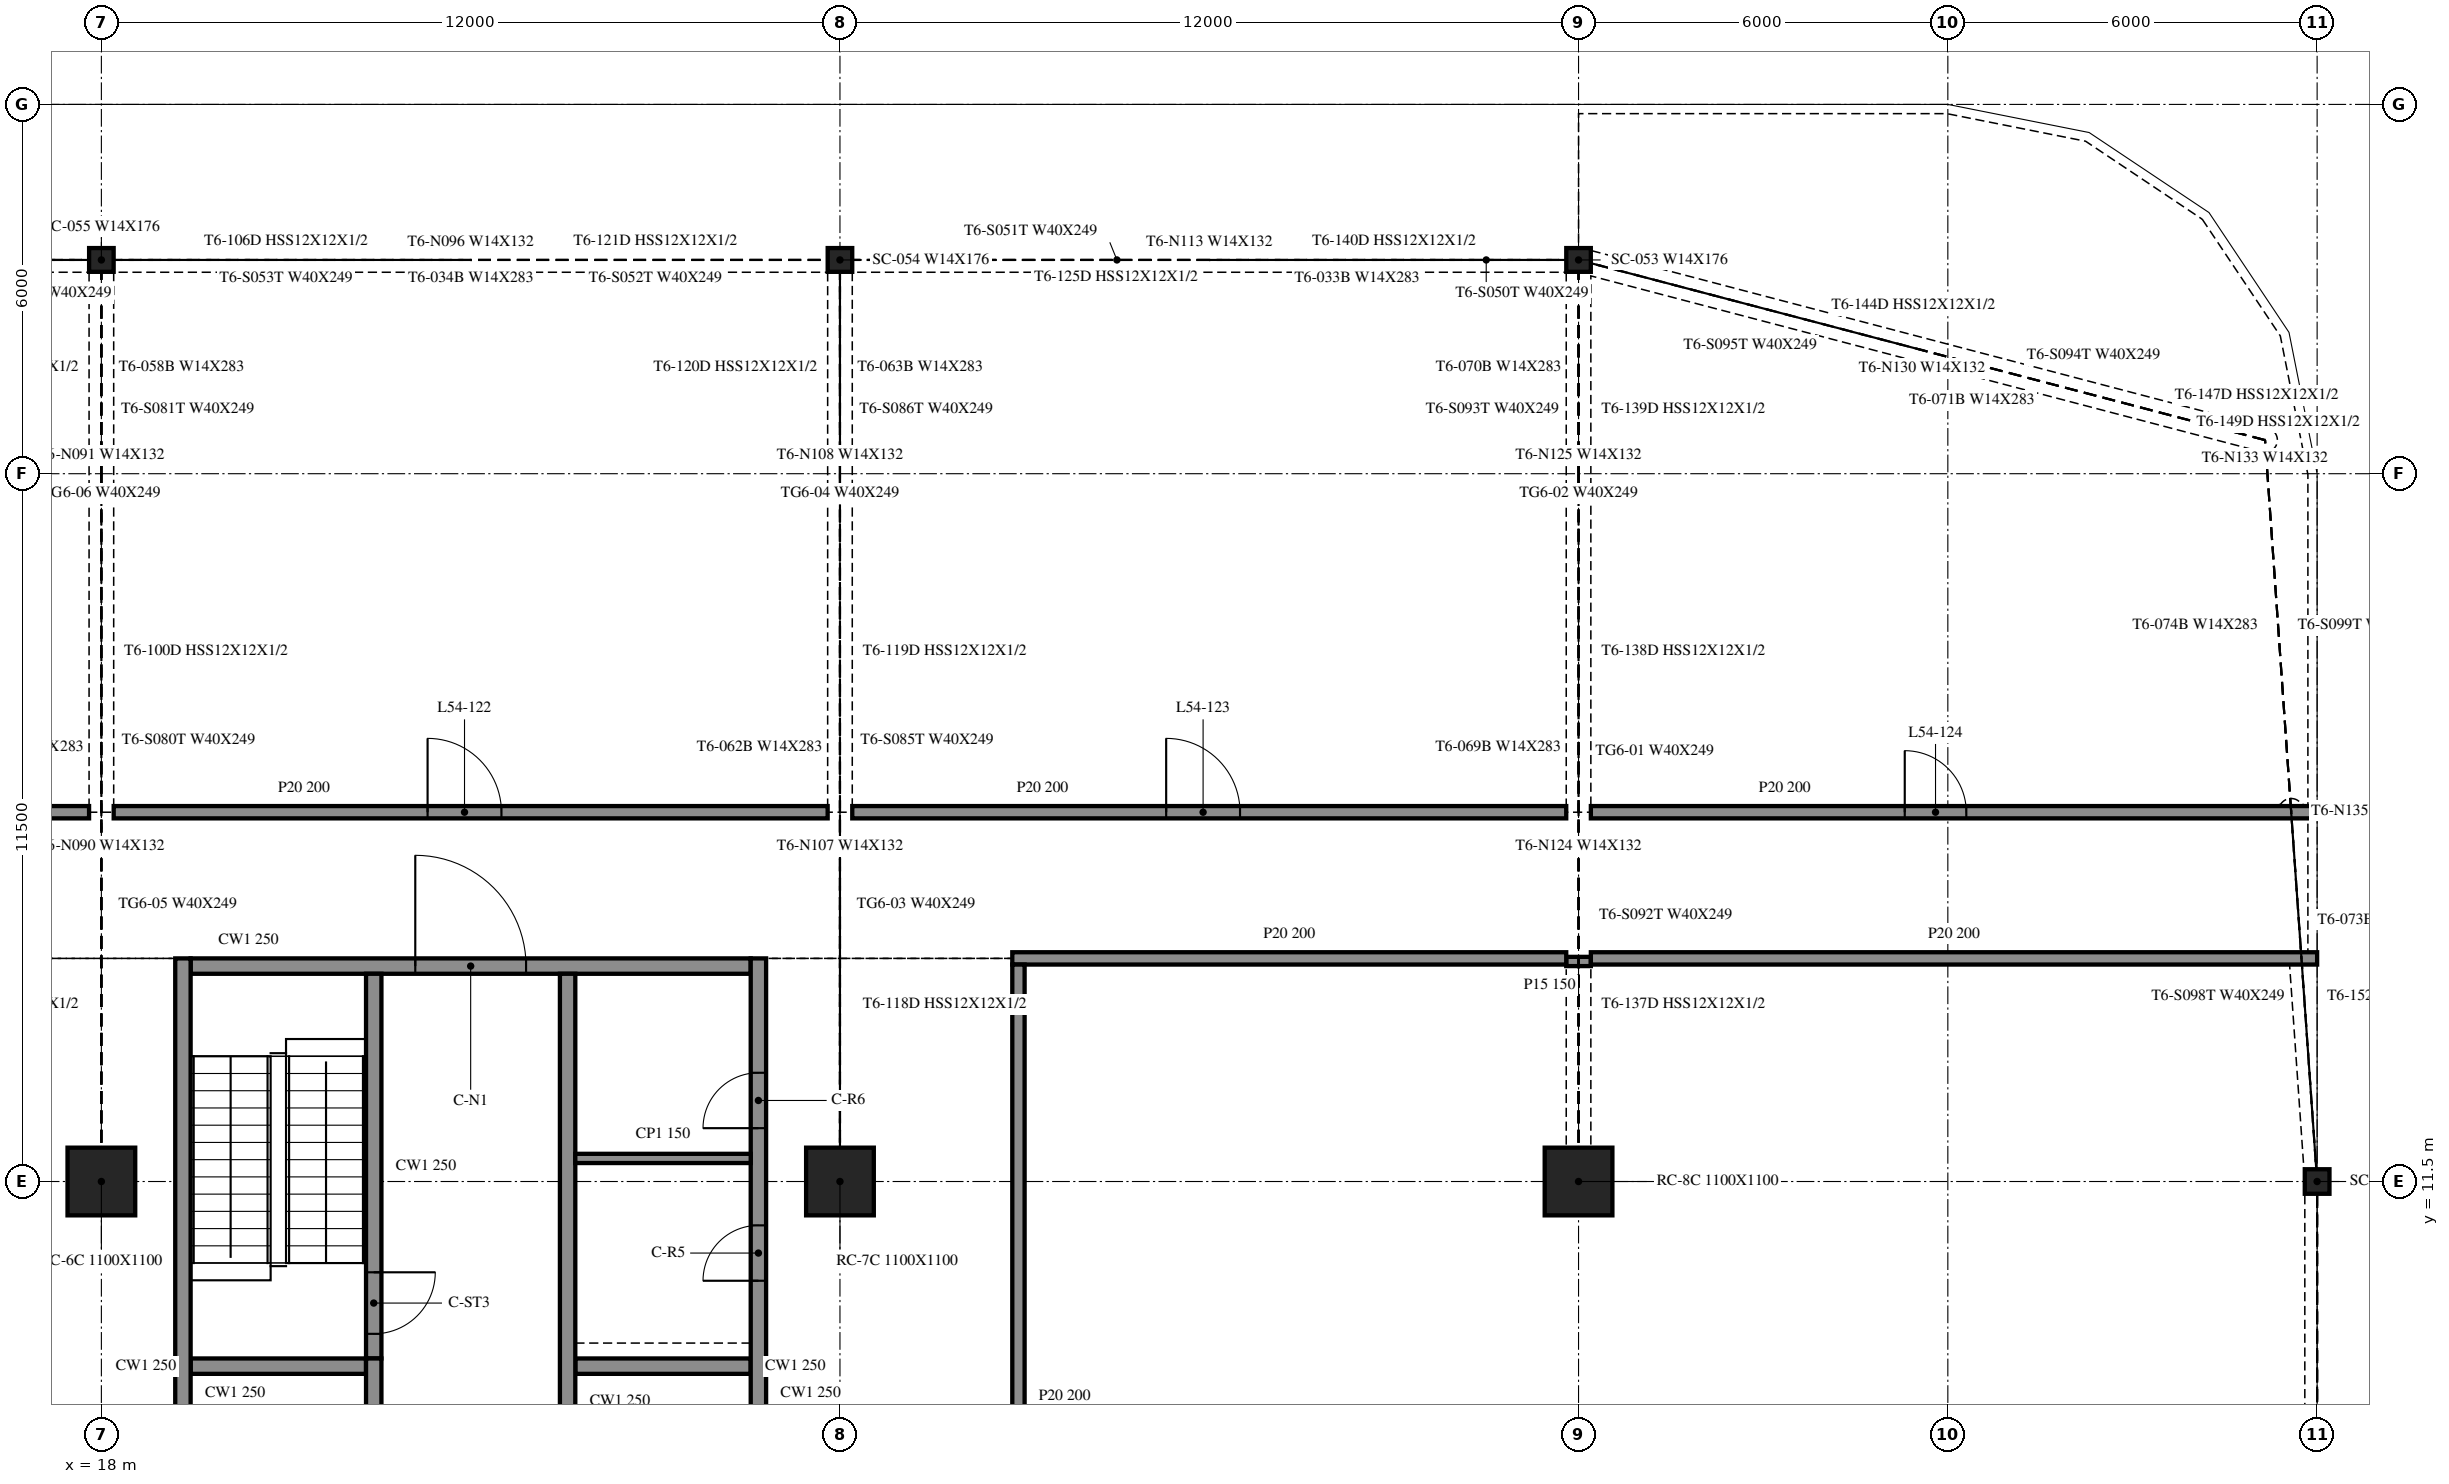
"""IFC4 building model, lengths in metres.
Left out: names, types, materials, properties, quantities, classifications, styles, units other than length and angle.
Written with IfcOpenShell. Run it as: python <this file> out.ifc"""

import sys

from ifc_helpers import new_model, si_unit, direction, frame, frame_2d, origin, origin_2d, place, context, subcontext, project, spatial, rectangle, i_section, extrude, element, fill, save


model = new_model("IFC4")
c1 = context("Model", 3, precision=1e-05, world=origin(), true_north=direction((0.0, 1.0)))
c2 = subcontext(c1, "Body", "Model", "MODEL_VIEW")
j1 = project(units=[si_unit("LENGTHUNIT", "METRE"), si_unit("PLANEANGLEUNIT", "RADIAN")], contexts=[c1])
p1 = place(None, origin())
s1 = spatial("IfcSite", under=j1, at=p1, CompositionType="ELEMENT")
p2 = place(p1, origin())
s2 = spatial("IfcBuilding", under=s1, at=p2, CompositionType="ELEMENT")
p3 = place(p2, frame((0.0, 0.0, 224.3)))
s3 = spatial("IfcBuildingStorey", under=s2, at=p3, CompositionType="ELEMENT", Elevation=224.3)
for number, where, z_axis, x_axis in (
    (1, (18.0, 11.5, -0.4), (0.0, 0.0, 1.0), (1.0, 0.0, 0.0)),
    (2, (30.0, 11.5, -0.4), (0.0, 0.0, 1.0), (1.0, 0.0, 0.0)),
    (3, (42.0, 11.5, -0.4), (0.0, 0.0, 1.0), (1.0, 0.0, 0.0)),
):
    element("IfcColumn", number, at=place(p3, frame(where, z_axis=z_axis, x_axis=x_axis)), inside=s3, PredefinedType="COLUMN", context=c2, shape_type="SweptSolid", body=[
        extrude(rectangle(XDim=1.1, YDim=1.1, at=origin_2d()), origin(), (0.0, 0.0, 1.0), 4.36),
    ])
p4 = place(p3, frame((54.0, 11.5, -0.4), z_axis=(0.0, 0.0, 1.0), x_axis=(1.0, 0.0, 0.0)))
e4 = element("IfcColumn", 4, at=p4, inside=s3, PredefinedType="COLUMN", context=c2, shape_type="SweptSolid", body=[
    extrude(i_section(OverallWidth=0.401, OverallDepth=0.399, WebThickness=0.025, FlangeThickness=0.04, at=origin_2d()), origin(), (0.0, 0.0, 1.0), 4.36),
])
for number, where, z_axis, x_axis in (
    (5, (42.0, 26.473, -0.4), (0.0, 0.0, 1.0), (1.0, 0.0, 0.0)),
    (6, (30.0, 26.473, -0.4), (0.0, 0.0, 1.0), (1.0, 0.0, 0.0)),
    (7, (18.0, 26.473, -0.4), (0.0, 0.0, 1.0), (1.0, 0.0, 0.0)),
):
    element("IfcColumn", number, at=place(p3, frame(where, z_axis=z_axis, x_axis=x_axis)), inside=s3, PredefinedType="COLUMN", context=c2, shape_type="SweptSolid", body=[
        extrude(i_section(OverallWidth=0.399, OverallDepth=0.386, WebThickness=0.021, FlangeThickness=0.033, at=origin_2d()), origin(), (0.0, 0.0, 1.0), 4.36),
    ])
p5 = place(p3, frame((19.325, 15.125, 0.0), z_axis=(0.0, 0.0, 1.0), x_axis=(0.0, -1.0, 0.0)))
e8 = element("IfcWall", 8, at=p5, inside=s3, PredefinedType="SOLIDWALL", context=c2, shape_type="SweptSolid", body=[
    extrude(rectangle(XDim=24.25, YDim=0.25, at=frame_2d((12.125, 0.0))), origin(), (0.0, 0.0, 1.0), 3.96),
])
p6 = place(p3, frame((28.675, -9.125, 0.0), z_axis=(0.0, 0.0, 1.0), x_axis=(0.0, 1.0, 0.0)))
e9 = element("IfcWall", 9, at=p6, inside=s3, PredefinedType="SOLIDWALL", context=c2, shape_type="SweptSolid", body=[
    extrude(rectangle(XDim=24.25, YDim=0.25, at=frame_2d((12.125, 0.0))), origin(), (0.0, 0.0, 1.0), 3.96),
])
p7 = place(p6, frame((14.425, 0.0, 0.0)))
e10 = element("IfcOpeningElement", 10, at=p7, cuts=e9, PredefinedType="OPENING", context=c2, shape_type="SweptSolid", body=[
    extrude(rectangle(XDim=0.9, YDim=2.1, at=frame_2d((0.45, 1.05))), frame((0.0, 0.135, 0.0), z_axis=(0.0, -1.0, 0.0), x_axis=(1.0, 0.0, 0.0)), (0.0, 0.0, 1.0), 0.27),
])
p8 = place(p6, frame((19.012, 0.0, 0.0)))
e11 = element("IfcOpeningElement", 11, at=p8, cuts=e9, PredefinedType="OPENING", context=c2, shape_type="SweptSolid", body=[
    extrude(rectangle(XDim=0.9, YDim=2.1, at=frame_2d((0.45, 1.05))), frame((0.0, 0.135, 0.0), z_axis=(0.0, -1.0, 0.0), x_axis=(1.0, 0.0, 0.0)), (0.0, 0.0, 1.0), 0.27),
])
p9 = place(p6, frame((21.492, 0.0, 0.0)))
e12 = element("IfcOpeningElement", 12, at=p9, cuts=e9, PredefinedType="OPENING", context=c2, shape_type="SweptSolid", body=[
    extrude(rectangle(XDim=0.9, YDim=2.1, at=frame_2d((0.45, 1.05))), frame((0.0, 0.135, 0.0), z_axis=(0.0, -1.0, 0.0), x_axis=(1.0, 0.0, 0.0)), (0.0, 0.0, 1.0), 0.27),
])
p10 = place(p3, frame((19.45, 15.0, 0.0), z_axis=(0.0, 0.0, 1.0), x_axis=(1.0, 0.0, 0.0)))
e13 = element("IfcWall", 13, at=p10, inside=s3, PredefinedType="SOLIDWALL", context=c2, shape_type="SweptSolid", body=[
    extrude(rectangle(XDim=9.1, YDim=0.25, at=frame_2d((4.55, 0.0))), origin(), (0.0, 0.0, 1.0), 3.96),
])
p11 = place(p10, frame((3.65, 0.0, 0.0)))
e14 = element("IfcOpeningElement", 14, at=p11, cuts=e13, PredefinedType="OPENING", context=c2, shape_type="SweptSolid", body=[
    extrude(rectangle(XDim=1.8, YDim=2.1, at=frame_2d((0.9, 1.05))), frame((0.0, 0.135, 0.0), z_axis=(0.0, -1.0, 0.0), x_axis=(1.0, 0.0, 0.0)), (0.0, 0.0, 1.0), 0.27),
])
p12 = place(p3, frame((22.425, -8.875, 0.0), z_axis=(0.0, 0.0, 1.0), x_axis=(0.0, 1.0, 0.0)))
e15 = element("IfcWall", 15, at=p12, inside=s3, PredefinedType="SOLIDWALL", context=c2, shape_type="SweptSolid", body=[
    extrude(rectangle(XDim=17.5, YDim=0.25, at=frame_2d((8.75, 0.0))), origin(), (0.0, 0.0, 1.0), 3.96),
])
p13 = place(p12, frame((7.2, 0.0, 0.0)))
e16 = element("IfcOpeningElement", 16, at=p13, cuts=e15, PredefinedType="OPENING", context=c2, shape_type="SweptSolid", body=[
    extrude(rectangle(XDim=1.1, YDim=2.1, at=frame_2d((0.55, 1.05))), frame((0.0, 0.135, 0.0), z_axis=(0.0, -1.0, 0.0), x_axis=(1.0, 0.0, 0.0)), (0.0, 0.0, 1.0), 0.27),
])
p14 = place(p12, frame((9.95, 0.0, 0.0)))
e17 = element("IfcOpeningElement", 17, at=p14, cuts=e15, PredefinedType="OPENING", context=c2, shape_type="SweptSolid", body=[
    extrude(rectangle(XDim=1.1, YDim=2.1, at=frame_2d((0.55, 1.05))), frame((0.0, 0.135, 0.0), z_axis=(0.0, -1.0, 0.0), x_axis=(1.0, 0.0, 0.0)), (0.0, 0.0, 1.0), 0.27),
])
p15 = place(p12, frame((12.7, 0.0, 0.0)))
e18 = element("IfcOpeningElement", 18, at=p15, cuts=e15, PredefinedType="OPENING", context=c2, shape_type="SweptSolid", body=[
    extrude(rectangle(XDim=1.1, YDim=2.1, at=frame_2d((0.55, 1.05))), frame((0.0, 0.135, 0.0), z_axis=(0.0, -1.0, 0.0), x_axis=(1.0, 0.0, 0.0)), (0.0, 0.0, 1.0), 0.27),
])
p16 = place(p12, frame((15.45, 0.0, 0.0)))
e19 = element("IfcOpeningElement", 19, at=p16, cuts=e15, PredefinedType="OPENING", context=c2, shape_type="SweptSolid", body=[
    extrude(rectangle(XDim=1.1, YDim=2.1, at=frame_2d((0.55, 1.05))), frame((0.0, 0.135, 0.0), z_axis=(0.0, -1.0, 0.0), x_axis=(1.0, 0.0, 0.0)), (0.0, 0.0, 1.0), 0.27),
])
p17 = place(p12, frame((1.012, 0.0, 0.0)))
e20 = element("IfcOpeningElement", 20, at=p17, cuts=e15, PredefinedType="OPENING", context=c2, shape_type="SweptSolid", body=[
    extrude(rectangle(XDim=0.9, YDim=2.1, at=frame_2d((0.45, 1.05))), frame((0.0, 0.135, 0.0), z_axis=(0.0, -1.0, 0.0), x_axis=(1.0, 0.0, 0.0)), (0.0, 0.0, 1.0), 0.27),
])
p18 = place(p12, frame((4.087, 0.0, 0.0)))
e21 = element("IfcOpeningElement", 21, at=p18, cuts=e15, PredefinedType="OPENING", context=c2, shape_type="SweptSolid", body=[
    extrude(rectangle(XDim=0.9, YDim=2.1, at=frame_2d((0.45, 1.05))), frame((0.0, 0.135, 0.0), z_axis=(0.0, -1.0, 0.0), x_axis=(1.0, 0.0, 0.0)), (0.0, 0.0, 1.0), 0.27),
])
p19 = place(p3, frame((22.425, 14.875, 0.0), z_axis=(0.0, 0.0, 1.0), x_axis=(0.0, -1.0, 0.0)))
e22 = element("IfcWall", 22, at=p19, inside=s3, PredefinedType="SOLIDWALL", context=c2, shape_type="SweptSolid", body=[
    extrude(rectangle(XDim=6.25, YDim=0.25, at=frame_2d((3.125, 0.0))), origin(), (0.0, 0.0, 1.0), 3.96),
])
p20 = place(p19, frame((4.85, 0.0, 0.0)))
e23 = element("IfcOpeningElement", 23, at=p20, cuts=e22, PredefinedType="OPENING", context=c2, shape_type="SweptSolid", body=[
    extrude(rectangle(XDim=1.0, YDim=2.1, at=frame_2d((0.5, 1.05))), frame((0.0, 0.135, 0.0), z_axis=(0.0, -1.0, 0.0), x_axis=(1.0, 0.0, 0.0)), (0.0, 0.0, 1.0), 0.27),
])
p21 = place(p3, frame((25.575, 14.875, 0.0), z_axis=(0.0, 0.0, 1.0), x_axis=(0.0, -1.0, 0.0)))
e24 = element("IfcWall", 24, at=p21, inside=s3, PredefinedType="SOLIDWALL", context=c2, shape_type="SweptSolid", body=[
    extrude(rectangle(XDim=17.5, YDim=0.25, at=frame_2d((8.75, 0.0))), origin(), (0.0, 0.0, 1.0), 3.96),
])
p22 = place(p21, frame((15.45, 0.0, 0.0)))
e25 = element("IfcOpeningElement", 25, at=p22, cuts=e24, PredefinedType="OPENING", context=c2, shape_type="SweptSolid", body=[
    extrude(rectangle(XDim=1.1, YDim=2.1, at=frame_2d((0.55, 1.05))), frame((0.0, 0.135, 0.0), z_axis=(0.0, -1.0, 0.0), x_axis=(1.0, 0.0, 0.0)), (0.0, 0.0, 1.0), 0.27),
])
p23 = place(p21, frame((12.8, 0.0, 0.0)))
e26 = element("IfcOpeningElement", 26, at=p23, cuts=e24, PredefinedType="OPENING", context=c2, shape_type="SweptSolid", body=[
    extrude(rectangle(XDim=0.9, YDim=2.1, at=frame_2d((0.45, 1.05))), frame((0.0, 0.135, 0.0), z_axis=(0.0, -1.0, 0.0), x_axis=(1.0, 0.0, 0.0)), (0.0, 0.0, 1.0), 0.27),
])
for number, where, z_axis, x_axis in (
    (27, (19.45, 8.5, 0.0), (0.0, 0.0, 1.0), (1.0, 0.0, 0.0)),
    (28, (25.7, 8.5, 0.0), (0.0, 0.0, 1.0), (1.0, 0.0, 0.0)),
):
    element("IfcWall", number, at=place(p3, frame(where, z_axis=z_axis, x_axis=x_axis)), inside=s3, PredefinedType="SOLIDWALL", context=c2, shape_type="SweptSolid", body=[
        extrude(rectangle(XDim=2.85, YDim=0.25, at=frame_2d((1.425, 0.0))), origin(), (0.0, 0.0, 1.0), 3.96),
    ])
p24 = place(p3, frame((25.7, 11.875, 0.0), z_axis=(0.0, 0.0, 1.0), x_axis=(1.0, 0.0, 0.0)))
e29 = element("IfcWall", 29, at=p24, inside=s3, PredefinedType="PARTITIONING", context=c2, shape_type="SweptSolid", body=[
    extrude(rectangle(XDim=2.85, YDim=0.15, at=frame_2d((1.425, 0.0))), origin(), (0.0, 0.0, 1.0), 3.96),
])
p25 = place(p3, frame((41.8, 15.075, 0.0), z_axis=(0.0, 0.0, 1.0), x_axis=(1.0, 0.0, 0.0)))
e30 = element("IfcWall", 30, at=p25, inside=s3, PredefinedType="PARTITIONING", context=c2, shape_type="SweptSolid", body=[
    extrude(rectangle(XDim=0.4, YDim=0.15, at=frame_2d((0.2, 0.0))), origin(), (0.0, 0.0, 1.0), 3.96),
])
p26 = place(p3, frame((32.8, 15.125, 0.0), z_axis=(0.0, 0.0, 1.0), x_axis=(1.0, 0.0, 0.0)))
e31 = element("IfcWall", 31, at=p26, inside=s3, PredefinedType="PARTITIONING", context=c2, shape_type="SweptSolid", body=[
    extrude(rectangle(XDim=9.0, YDim=0.2, at=frame_2d((4.5, 0.0))), origin(), (0.0, 0.0, 1.0), 3.96),
])
p27 = place(p3, frame((42.2, 15.125, 0.0), z_axis=(0.0, 0.0, 1.0), x_axis=(1.0, 0.0, 0.0)))
e32 = element("IfcWall", 32, at=p27, inside=s3, PredefinedType="PARTITIONING", context=c2, shape_type="SweptSolid", body=[
    extrude(rectangle(XDim=11.8, YDim=0.2, at=frame_2d((5.9, 0.0))), origin(), (0.0, 0.0, 1.0), 3.96),
])
p28 = place(p3, frame((6.2, 17.5, 0.0), z_axis=(0.0, 0.0, 1.0), x_axis=(1.0, 0.0, 0.0)))
e33 = element("IfcWall", 33, at=p28, inside=s3, PredefinedType="PARTITIONING", context=c2, shape_type="SweptSolid", body=[
    extrude(rectangle(XDim=11.6, YDim=0.2, at=frame_2d((5.8, 0.0))), origin(), (0.0, 0.0, 1.0), 3.96),
])
p29 = place(p28, frame((5.3, 0.0, 0.0)))
e34 = element("IfcOpeningElement", 34, at=p29, cuts=e33, PredefinedType="OPENING", context=c2, shape_type="SweptSolid", body=[
    extrude(rectangle(XDim=1.0, YDim=2.1, at=frame_2d((0.5, 1.05))), frame((0.0, 0.11, 0.0), z_axis=(0.0, -1.0, 0.0), x_axis=(1.0, 0.0, 0.0)), (0.0, 0.0, 1.0), 0.22),
])
p30 = place(p3, frame((18.2, 17.5, 0.0), z_axis=(0.0, 0.0, 1.0), x_axis=(1.0, 0.0, 0.0)))
e35 = element("IfcWall", 35, at=p30, inside=s3, PredefinedType="PARTITIONING", context=c2, shape_type="SweptSolid", body=[
    extrude(rectangle(XDim=11.6, YDim=0.2, at=frame_2d((5.8, 0.0))), origin(), (0.0, 0.0, 1.0), 3.96),
])
p31 = place(p30, frame((5.1, 0.0, 0.0)))
e36 = element("IfcOpeningElement", 36, at=p31, cuts=e35, PredefinedType="OPENING", context=c2, shape_type="SweptSolid", body=[
    extrude(rectangle(XDim=1.2, YDim=2.1, at=frame_2d((0.6, 1.05))), frame((0.0, 0.11, 0.0), z_axis=(0.0, -1.0, 0.0), x_axis=(1.0, 0.0, 0.0)), (0.0, 0.0, 1.0), 0.22),
])
p32 = place(p3, frame((30.2, 17.5, 0.0), z_axis=(0.0, 0.0, 1.0), x_axis=(1.0, 0.0, 0.0)))
e37 = element("IfcWall", 37, at=p32, inside=s3, PredefinedType="PARTITIONING", context=c2, shape_type="SweptSolid", body=[
    extrude(rectangle(XDim=11.6, YDim=0.2, at=frame_2d((5.8, 0.0))), origin(), (0.0, 0.0, 1.0), 3.96),
])
p33 = place(p32, frame((5.1, 0.0, 0.0)))
e38 = element("IfcOpeningElement", 38, at=p33, cuts=e37, PredefinedType="OPENING", context=c2, shape_type="SweptSolid", body=[
    extrude(rectangle(XDim=1.2, YDim=2.1, at=frame_2d((0.6, 1.05))), frame((0.0, 0.11, 0.0), z_axis=(0.0, -1.0, 0.0), x_axis=(1.0, 0.0, 0.0)), (0.0, 0.0, 1.0), 0.22),
])
p34 = place(p3, frame((42.2, 17.5, 0.0), z_axis=(0.0, 0.0, 1.0), x_axis=(1.0, 0.0, 0.0)))
e39 = element("IfcWall", 39, at=p34, inside=s3, PredefinedType="PARTITIONING", context=c2, shape_type="SweptSolid", body=[
    extrude(rectangle(XDim=11.8, YDim=0.2, at=frame_2d((5.9, 0.0))), origin(), (0.0, 0.0, 1.0), 3.96),
])
p35 = place(p34, frame((5.1, 0.0, 0.0)))
e40 = element("IfcOpeningElement", 40, at=p35, cuts=e39, PredefinedType="OPENING", context=c2, shape_type="SweptSolid", body=[
    extrude(rectangle(XDim=1.0, YDim=2.1, at=frame_2d((0.5, 1.05))), frame((0.0, 0.11, 0.0), z_axis=(0.0, -1.0, 0.0), x_axis=(1.0, 0.0, 0.0)), (0.0, 0.0, 1.0), 0.22),
])
p36 = place(p3, frame((32.9, -9.025, 0.0), z_axis=(0.0, 0.0, 1.0), x_axis=(0.0, 1.0, 0.0)))
e41 = element("IfcWall", 41, at=p36, inside=s3, PredefinedType="PARTITIONING", context=c2, shape_type="SweptSolid", body=[
    extrude(rectangle(XDim=24.05, YDim=0.2, at=frame_2d((12.025, 0.0))), origin(), (0.0, 0.0, 1.0), 3.96),
])
p37 = place(p36, frame((11.5, 0.0, 0.0)))
e42 = element("IfcOpeningElement", 42, at=p37, cuts=e41, PredefinedType="OPENING", context=c2, shape_type="SweptSolid", body=[
    extrude(rectangle(XDim=1.0, YDim=2.1, at=frame_2d((0.5, 1.05))), frame((0.0, 0.11, 0.0), z_axis=(0.0, -1.0, 0.0), x_axis=(1.0, 0.0, 0.0)), (0.0, 0.0, 1.0), 0.22),
])
p38 = place(p11, origin())
e43 = element("IfcDoor", 43, at=p38, inside=s3, OperationType="DOUBLE_DOOR_SINGLE_SWING", PredefinedType="DOOR", context=c2, shape_type="SweptSolid", body=[
    extrude(rectangle(XDim=1.8, YDim=2.1, at=frame_2d((0.9, 1.05))), frame((0.0, 0.025, 0.0), z_axis=(0.0, -1.0, 0.0), x_axis=(1.0, 0.0, 0.0)), (0.0, 0.0, 1.0), 0.05),
])
fill(e14, e43)
p39 = place(p8, origin())
e44 = element("IfcDoor", 44, at=p39, inside=s3, OperationType="SINGLE_SWING_LEFT", PredefinedType="DOOR", context=c2, shape_type="SweptSolid", body=[
    extrude(rectangle(XDim=0.9, YDim=2.1, at=frame_2d((0.45, 1.05))), frame((0.0, 0.025, 0.0), z_axis=(0.0, -1.0, 0.0), x_axis=(1.0, 0.0, 0.0)), (0.0, 0.0, 1.0), 0.05),
])
fill(e11, e44)
p40 = place(p9, origin())
e45 = element("IfcDoor", 45, at=p40, inside=s3, OperationType="SINGLE_SWING_RIGHT", PredefinedType="DOOR", context=c2, shape_type="SweptSolid", body=[
    extrude(rectangle(XDim=0.9, YDim=2.1, at=frame_2d((0.45, 1.05))), frame((0.0, 0.025, 0.0), z_axis=(0.0, -1.0, 0.0), x_axis=(1.0, 0.0, 0.0)), (0.0, 0.0, 1.0), 0.05),
])
fill(e12, e45)
p41 = place(p20, origin())
e46 = element("IfcDoor", 46, at=p41, inside=s3, OperationType="SINGLE_SWING_LEFT", PredefinedType="DOOR", context=c2, shape_type="SweptSolid", body=[
    extrude(rectangle(XDim=1.0, YDim=2.1, at=frame_2d((0.5, 1.05))), frame((0.0, 0.025, 0.0), z_axis=(0.0, -1.0, 0.0), x_axis=(1.0, 0.0, 0.0)), (0.0, 0.0, 1.0), 0.05),
])
fill(e23, e46)
p42 = place(p31, origin())
e47 = element("IfcDoor", 47, at=p42, inside=s3, OperationType="SINGLE_SWING_LEFT", PredefinedType="DOOR", context=c2, shape_type="SweptSolid", body=[
    extrude(rectangle(XDim=1.2, YDim=2.1, at=frame_2d((0.6, 1.05))), frame((0.0, 0.025, 0.0), z_axis=(0.0, -1.0, 0.0), x_axis=(1.0, 0.0, 0.0)), (0.0, 0.0, 1.0), 0.05),
])
fill(e36, e47)
p43 = place(p33, origin())
e48 = element("IfcDoor", 48, at=p43, inside=s3, OperationType="SINGLE_SWING_LEFT", PredefinedType="DOOR", context=c2, shape_type="SweptSolid", body=[
    extrude(rectangle(XDim=1.2, YDim=2.1, at=frame_2d((0.6, 1.05))), frame((0.0, 0.025, 0.0), z_axis=(0.0, -1.0, 0.0), x_axis=(1.0, 0.0, 0.0)), (0.0, 0.0, 1.0), 0.05),
])
fill(e38, e48)
p44 = place(p35, origin())
e49 = element("IfcDoor", 49, at=p44, inside=s3, OperationType="SINGLE_SWING_RIGHT", PredefinedType="DOOR", context=c2, shape_type="SweptSolid", body=[
    extrude(rectangle(XDim=1.0, YDim=2.1, at=frame_2d((0.5, 1.05))), frame((0.0, 0.025, 0.0), z_axis=(0.0, -1.0, 0.0), x_axis=(1.0, 0.0, 0.0)), (0.0, 0.0, 1.0), 0.05),
])
fill(e40, e49)
save(model, sys.argv[1])
